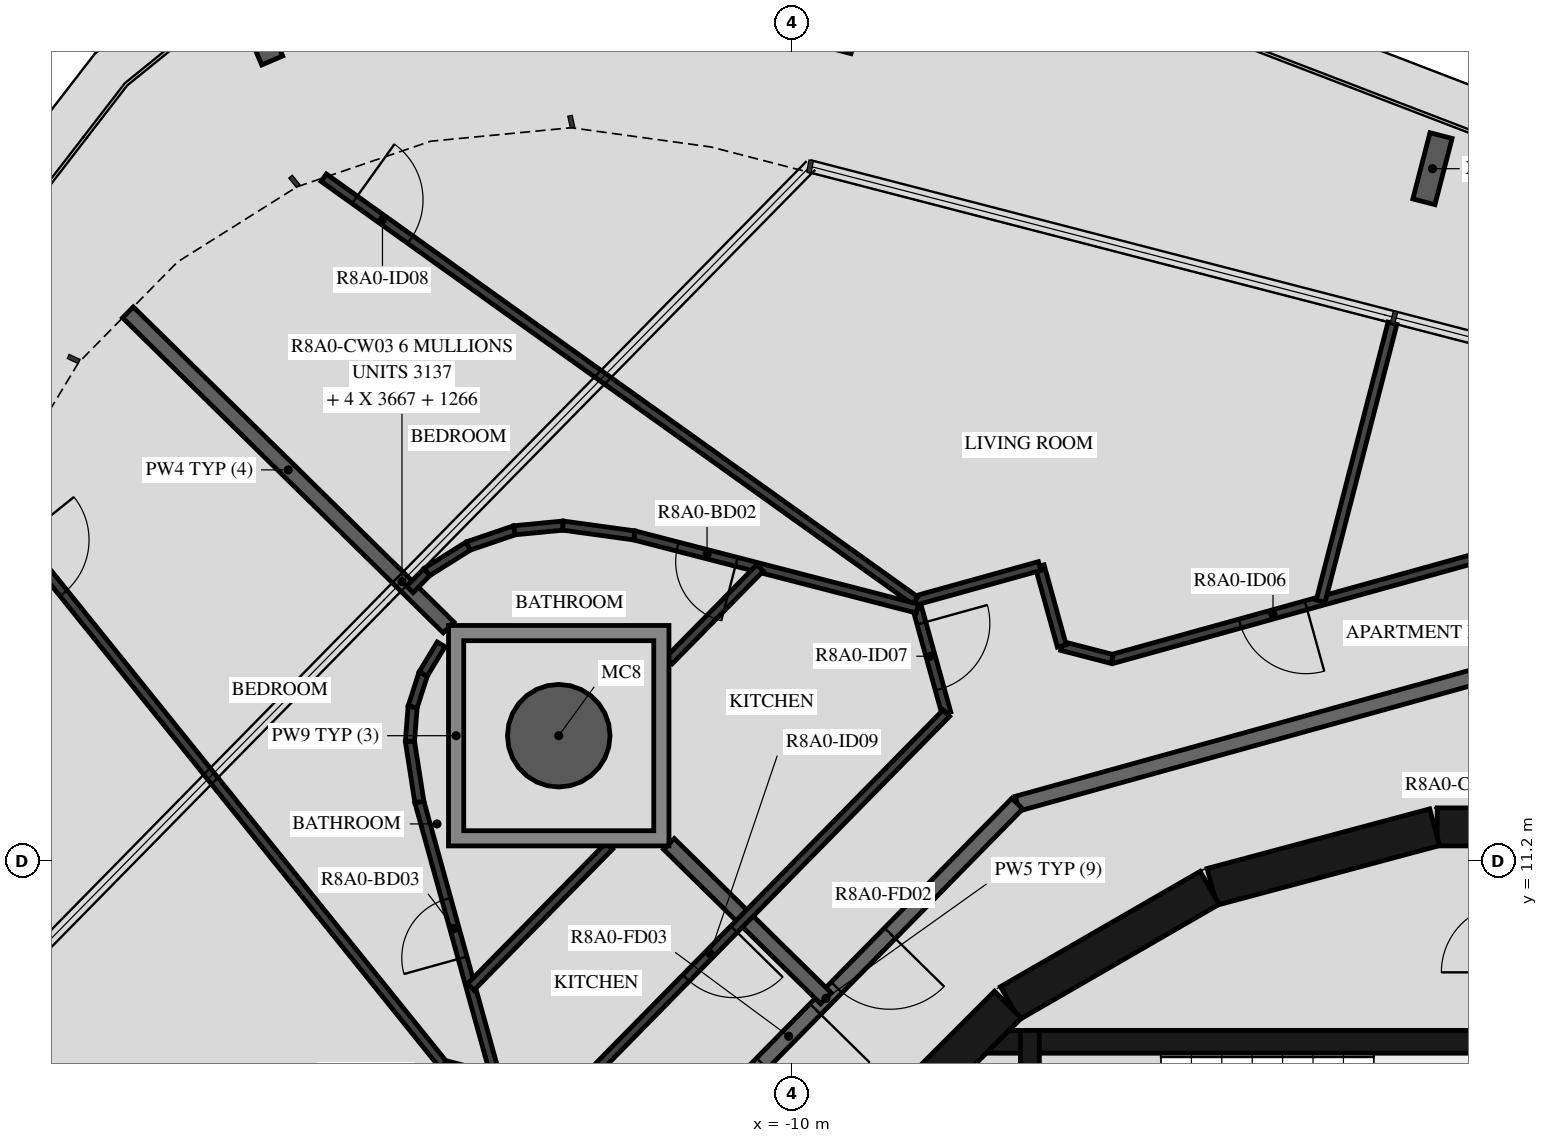
"""IFC4 building model, lengths in metres.
Left out: names, types, materials, properties, quantities, classifications, styles, units other than length and angle.
Written with IfcOpenShell. Run it as: python <this file> out.ifc"""

import sys

from ifc_helpers import new_model, si_unit, direction, frame, frame_2d, origin, origin_2d, place, context, subcontext, project, spatial, polyline, rectangle, hollow_circle, i_section, outline, extrude, element, fill, save


model = new_model("IFC4")
c1 = context("Model", 3, precision=1e-05, world=origin(), true_north=direction((0.0, 1.0)))
c2 = subcontext(c1, "Body", "Model", "MODEL_VIEW")
j1 = project(units=[si_unit("LENGTHUNIT", "METRE"), si_unit("PLANEANGLEUNIT", "RADIAN")], contexts=[c1])
p1 = place(None, origin())
s1 = spatial("IfcSite", under=j1, at=p1, CompositionType="ELEMENT")
p2 = place(p1, origin())
s2 = spatial("IfcBuilding", under=s1, at=p2, CompositionType="ELEMENT")
p3 = place(p2, frame((0.0, 0.0, 298.2)))
s3 = spatial("IfcBuildingStorey", under=s2, at=p3, CompositionType="ELEMENT", Elevation=298.2)
p4 = place(p3, frame((-13.073, 12.847, -0.45), z_axis=(0.0, 0.0, 1.0), x_axis=(1.0, 0.0, 0.0)))
e1 = element("IfcColumn", 1, at=p4, inside=s3, PredefinedType="COLUMN", context=c2, shape_type="SweptSolid", body=[
    extrude(hollow_circle(Radius=0.675, WallThickness=0.03, at=origin_2d()), origin(), (0.0, 0.0, 1.0), 3.57),
])
for number, where, z_axis, x_axis in (
    (2, (-1.579, 20.307, -0.45), (0.0, 0.0, 1.0), (0.968, -0.25, 0.0)),
    (3, (-9.261, 22.293, -0.45), (0.0, 0.0, 1.0), (0.968, -0.25, 0.0)),
    (4, (-17.019, 22.145, -0.45), (0.0, 0.0, 1.0), (0.921, 0.391, 0.0)),
):
    element("IfcColumn", number, at=place(p3, frame(where, z_axis=z_axis, x_axis=x_axis)), inside=s3, PredefinedType="COLUMN", context=c2, shape_type="SweptSolid", body=[
        extrude(i_section(OverallWidth=0.3, OverallDepth=0.9, WebThickness=0.019, FlangeThickness=0.035, FilletRadius=0.03, at=origin_2d()), origin(), (0.0, 0.0, 1.0), 3.57),
    ])
for number, where, z_axis, x_axis in (
    (5, (1.516, 11.647, 0.0), (0.0, 0.0, 1.0), (-1.0, 0.0, 0.0)),
    (6, (-1.55, 11.643, 0.0), (0.0, 0.0, 1.0), (-0.966, -0.259, 0.0)),
    (7, (-4.51, 10.845, 0.0), (0.0, 0.0, 1.0), (-0.866, -0.5, 0.0)),
):
    element("IfcWall", number, at=place(p3, frame(where, z_axis=z_axis, x_axis=x_axis)), inside=s3, PredefinedType="SHEAR", context=c2, shape_type="SweptSolid", body=[
        extrude(rectangle(XDim=3.033, YDim=0.5, at=frame_2d((1.516, 0.0))), origin(), (0.0, 0.0, 1.0), 3.12),
    ])
p5 = place(p3, frame((-7.164, 9.308, 0.0), z_axis=(0.0, 0.0, 1.0), x_axis=(-0.707106781187, -0.707106781187, 0.0)))
e8 = element("IfcWall", 8, at=p5, inside=s3, PredefinedType="SHEAR", context=c2, shape_type="SweptSolid", body=[
    extrude(rectangle(XDim=3.032, YDim=0.5, at=frame_2d((1.516, 0.0))), origin(), (0.0, 0.0, 1.0), 3.12),
])
p6 = place(p5, frame((1.416, 0.0, 0.0)))
e9 = element("IfcOpeningElement", 9, at=p6, cuts=e8, PredefinedType="OPENING", context=c2, shape_type="SweptSolid", body=[
    extrude(rectangle(XDim=1.2, YDim=2.1, at=frame_2d((0.6, 1.05))), frame((0.0, 0.26, 0.0), z_axis=(0.0, -1.0, 0.0), x_axis=(1.0, 0.0, 0.0)), (0.0, 0.0, 1.0), 0.52),
])
p7 = place(p3, frame((-6.75, 8.82, 0.0), z_axis=(0.0, 0.0, 1.0), x_axis=(1.0, 0.0, 0.0)))
e10 = element("IfcWall", 10, at=p7, inside=s3, PredefinedType="SHEAR", context=c2, shape_type="SweptSolid", body=[
    extrude(rectangle(XDim=6.75, YDim=0.3, at=frame_2d((3.375, 0.0))), origin(), (0.0, 0.0, 1.0), 3.12),
])
p8 = place(p3, frame((-6.875, 8.97, 0.0), z_axis=(0.0, 0.0, 1.0), x_axis=(0.0, -1.0, 0.0)))
e11 = element("IfcWall", 11, at=p8, inside=s3, PredefinedType="SHEAR", context=c2, shape_type="SweptSolid", body=[
    extrude(rectangle(XDim=3.92, YDim=0.25, at=frame_2d((1.96, 0.0))), origin(), (0.0, 0.0, 1.0), 3.12),
])
p9 = place(p8, frame((1.61, 0.0, 0.0)))
e12 = element("IfcOpeningElement", 12, at=p9, cuts=e11, PredefinedType="OPENING", context=c2, shape_type="SweptSolid", body=[
    extrude(rectangle(XDim=1.2, YDim=2.1, at=frame_2d((0.6, 1.05))), frame((0.0, 0.135, 0.0), z_axis=(0.0, -1.0, 0.0), x_axis=(1.0, 0.0, 0.0)), (0.0, 0.0, 1.0), 0.27),
])
p10 = place(p3, origin())
e13 = element("IfcWall", 13, at=p10, inside=s3, PredefinedType="SHEAR", context=c2, shape_type="SweptSolid", body=[
    extrude(outline(polyline([(-7.148, 8.97), (-7.0, 8.97), (-7.0, 8.67), (-7.448, 8.67), (-7.148, 8.97)])), origin(), (0.0, 0.0, 1.0), 3.12),
])
p11 = place(p3, frame((-0.121, 13.872, 0.0), z_axis=(0.0, 0.0, 1.0), x_axis=(-0.963625960674, -0.267254575108, 0.0)))
e14 = element("IfcWall", 14, at=p11, inside=s3, PredefinedType="STANDARD", context=c2, shape_type="SweptSolid", body=[
    extrude(rectangle(XDim=7.181, YDim=0.2, at=frame_2d((3.591, 0.0))), origin(), (0.0, 0.0, 1.0), 3.12),
])
p12 = place(p3, frame((-7.041, 11.953, 0.0), z_axis=(0.0, 0.0, 1.0), x_axis=(-0.70090916255, -0.713250549143, 0.0)))
e15 = element("IfcWall", 15, at=p12, inside=s3, PredefinedType="STANDARD", context=c2, shape_type="SweptSolid", body=[
    extrude(rectangle(XDim=7.181, YDim=0.2, at=frame_2d((3.59, 0.0))), origin(), (0.0, 0.0, 1.0), 3.12),
])
p13 = place(p12, frame((2.39, 0.0, 0.0)))
e16 = element("IfcOpeningElement", 16, at=p13, cuts=e15, PredefinedType="OPENING", context=c2, shape_type="SweptSolid", body=[
    extrude(rectangle(XDim=1.0, YDim=2.1, at=frame_2d((0.5, 1.05))), frame((0.0, 0.11, 0.0), z_axis=(0.0, -1.0, 0.0), x_axis=(1.0, 0.0, 0.0)), (0.0, 0.0, 1.0), 0.22),
])
p14 = place(p12, frame((3.791, 0.0, 0.0)))
e17 = element("IfcOpeningElement", 17, at=p14, cuts=e15, PredefinedType="OPENING", context=c2, shape_type="SweptSolid", body=[
    extrude(rectangle(XDim=1.0, YDim=2.1, at=frame_2d((0.5, 1.05))), frame((0.0, 0.11, 0.0), z_axis=(0.0, -1.0, 0.0), x_axis=(1.0, 0.0, 0.0)), (0.0, 0.0, 1.0), 0.22),
])
p15 = place(p3, frame((-11.623, 11.422, 0.0), z_axis=(0.0, 0.0, 1.0), x_axis=(0.713233657229, -0.700926351478, 0.0)))
e18 = element("IfcWall", 18, at=p15, inside=s3, PredefinedType="STANDARD", context=c2, shape_type="SweptSolid", body=[
    extrude(rectangle(XDim=2.896, YDim=0.2, at=frame_2d((1.448, 0.0))), origin(), (0.0, 0.0, 1.0), 3.12),
])
p16 = place(p3, frame((-18.741, 18.417, 0.0), z_axis=(0.0, 0.0, 1.0), x_axis=(0.713252414586, -0.700907264256, 0.0)))
e19 = element("IfcWall", 19, at=p16, inside=s3, PredefinedType="STANDARD", context=c2, shape_type="SweptSolid", body=[
    extrude(rectangle(XDim=5.913, YDim=0.2, at=frame_2d((2.957, 0.0))), origin(), (0.0, 0.0, 1.0), 3.12),
])
p17 = place(p3, frame((-0.135, 15.425, 0.0), z_axis=(0.0, 0.0, 1.0), x_axis=(-0.963635182689, -0.267221321536, 0.0)))
e20 = element("IfcWall", 20, at=p17, inside=s3, PredefinedType="PARTITIONING", context=c2, shape_type="SweptSolid", body=[
    extrude(rectangle(XDim=5.871, YDim=0.12, at=frame_2d((2.936, 0.0))), origin(), (0.0, 0.0, 1.0), 3.12),
])
p18 = place(p17, frame((3.225, 0.0, 0.0)))
e21 = element("IfcOpeningElement", 21, at=p18, cuts=e20, PredefinedType="OPENING", context=c2, shape_type="SweptSolid", body=[
    extrude(rectangle(XDim=0.9, YDim=2.1, at=frame_2d((0.45, 1.05))), frame((0.0, 0.07, 0.0), z_axis=(0.0, -1.0, 0.0), x_axis=(1.0, 0.0, 0.0)), (0.0, 0.0, 1.0), 0.14),
])
p19 = place(p3, frame((-5.792, 13.856, 0.0), z_axis=(0.0, 0.0, 1.0), x_axis=(-0.968137965662, 0.250417410425, 0.0)))
e22 = element("IfcWall", 22, at=p19, inside=s3, PredefinedType="PARTITIONING", context=c2, shape_type="SweptSolid", body=[
    extrude(rectangle(XDim=0.684, YDim=0.12, at=frame_2d((0.342, 0.0))), origin(), (0.0, 0.0, 1.0), 3.12),
])
p20 = place(p3, frame((-6.455, 14.028, 0.0), z_axis=(0.0, 0.0, 1.0), x_axis=(-0.267355376842, 0.963597998376, 0.0)))
e23 = element("IfcWall", 23, at=p20, inside=s3, PredefinedType="PARTITIONING", context=c2, shape_type="SweptSolid", body=[
    extrude(rectangle(XDim=1.091, YDim=0.12, at=frame_2d((0.546, 0.0))), origin(), (0.0, 0.0, 1.0), 3.12),
])
p21 = place(p3, frame((-6.746, 15.079, 0.0), z_axis=(0.0, 0.0, 1.0), x_axis=(-0.963624820233, -0.267258687102, 0.0)))
e24 = element("IfcWall", 24, at=p21, inside=s3, PredefinedType="PARTITIONING", context=c2, shape_type="SweptSolid", body=[
    extrude(rectangle(XDim=1.7, YDim=0.12, at=frame_2d((0.85, 0.0))), origin(), (0.0, 0.0, 1.0), 3.12),
])
p22 = place(p3, frame((-8.355, 14.519, 0.0), z_axis=(0.0, 0.0, 1.0), x_axis=(0.267052638692, -0.963681943469, 0.0)))
e25 = element("IfcWall", 25, at=p22, inside=s3, PredefinedType="PARTITIONING", context=c2, shape_type="SweptSolid", body=[
    extrude(rectangle(XDim=1.427, YDim=0.12, at=frame_2d((0.713, 0.0))), origin(), (0.0, 0.0, 1.0), 3.12),
])
p23 = place(p22, frame((0.2, 0.0, 0.0)))
e26 = element("IfcOpeningElement", 26, at=p23, cuts=e25, PredefinedType="OPENING", context=c2, shape_type="SweptSolid", body=[
    extrude(rectangle(XDim=0.9, YDim=2.1, at=frame_2d((0.45, 1.05))), frame((0.0, 0.07, 0.0), z_axis=(0.0, -1.0, 0.0), x_axis=(1.0, 0.0, 0.0)), (0.0, 0.0, 1.0), 0.14),
])
p24 = place(p3, frame((-7.974, 13.144, 0.0), z_axis=(0.0, 0.0, 1.0), x_axis=(-0.700910366085, -0.713249366432, 0.0)))
e27 = element("IfcWall", 27, at=p24, inside=s3, PredefinedType="PARTITIONING", context=c2, shape_type="SweptSolid", body=[
    extrude(rectangle(XDim=7.083, YDim=0.12, at=frame_2d((3.542, 0.0))), origin(), (0.0, 0.0, 1.0), 3.12),
])
p25 = place(p24, frame((3.986, 0.0, 0.0)))
e28 = element("IfcOpeningElement", 28, at=p25, cuts=e27, PredefinedType="OPENING", context=c2, shape_type="SweptSolid", body=[
    extrude(rectangle(XDim=0.9, YDim=2.1, at=frame_2d((0.45, 1.05))), frame((0.0, 0.07, 0.0), z_axis=(0.0, -1.0, 0.0), x_axis=(1.0, 0.0, 0.0)), (0.0, 0.0, 1.0), 0.14),
])
p26 = place(p3, frame((-2.104, 18.273, 0.0), z_axis=(0.0, 0.0, 1.0), x_axis=(-0.250390133523, -0.968145020663, 0.0)))
e29 = element("IfcWall", 29, at=p26, inside=s3, PredefinedType="PARTITIONING", context=c2, shape_type="SweptSolid", body=[
    extrude(rectangle(XDim=3.777, YDim=0.12, at=frame_2d((1.889, 0.0))), origin(), (0.0, 0.0, 1.0), 2.73),
])
p27 = place(p3, frame((-16.165, 20.188, 0.0), z_axis=(0.0, 0.0, 1.0), x_axis=(0.813459166979, -0.581622028175, 0.0)))
e30 = element("IfcWall", 30, at=p27, inside=s3, PredefinedType="PARTITIONING", context=c2, shape_type="SweptSolid", body=[
    extrude(rectangle(XDim=9.565, YDim=0.12, at=frame_2d((4.782, 0.0))), origin(), (0.0, 0.0, 1.0), 3.12),
])
p28 = place(p27, frame((0.5, 0.0, 0.0)))
e31 = element("IfcOpeningElement", 31, at=p28, cuts=e30, PredefinedType="OPENING", context=c2, shape_type="SweptSolid", body=[
    extrude(rectangle(XDim=0.9, YDim=2.1, at=frame_2d((0.45, 1.05))), frame((0.0, 0.07, 0.0), z_axis=(0.0, -1.0, 0.0), x_axis=(1.0, 0.0, 0.0)), (0.0, 0.0, 1.0), 0.14),
])
p29 = place(p3, frame((-8.355, 14.519, 0.0), z_axis=(0.0, 0.0, 1.0), x_axis=(-0.968146911612, 0.250382821969, 0.0)))
e32 = element("IfcWall", 32, at=p29, inside=s3, PredefinedType="PARTITIONING", context=c2, shape_type="SweptSolid", body=[
    extrude(rectangle(XDim=3.847, YDim=0.12, at=frame_2d((1.923, 0.0))), origin(), (0.0, 0.0, 1.0), 3.12),
])
p30 = place(p29, frame((2.458, 0.0, 0.0)))
e33 = element("IfcOpeningElement", 33, at=p30, cuts=e32, PredefinedType="OPENING", context=c2, shape_type="SweptSolid", body=[
    extrude(rectangle(XDim=0.8, YDim=2.1, at=frame_2d((0.4, 1.05))), frame((0.0, 0.07, 0.0), z_axis=(0.0, -1.0, 0.0), x_axis=(1.0, 0.0, 0.0)), (0.0, 0.0, 1.0), 0.14),
])
p31 = place(p3, frame((-10.425, 15.054, 0.0), z_axis=(0.0, 0.0, 1.0), x_axis=(-0.700866383264, -0.713292585698, 0.0)))
e34 = element("IfcWall", 34, at=p31, inside=s3, PredefinedType="PARTITIONING", context=c2, shape_type="SweptSolid", body=[
    extrude(rectangle(XDim=1.709, YDim=0.12, at=frame_2d((0.854, 0.0))), origin(), (0.0, 0.0, 1.0), 3.12),
])
p32 = place(p3, frame((-15.032, 14.772, 0.0), z_axis=(0.0, 0.0, 1.0), x_axis=(0.701378407906, 0.712789119532, 0.0)))
e35 = element("IfcWall", 35, at=p32, inside=s3, PredefinedType="PARTITIONING", context=c2, shape_type="SweptSolid", body=[
    extrude(rectangle(XDim=0.321, YDim=0.12, at=frame_2d((0.161, 0.0))), origin(), (0.0, 0.0, 1.0), 3.12),
])
p33 = place(p3, frame((-14.807, 15.0, 0.0), z_axis=(0.0, 0.0, 1.0), x_axis=(0.846499451836, 0.532389592349, 0.0)))
e36 = element("IfcWall", 36, at=p33, inside=s3, PredefinedType="PARTITIONING", context=c2, shape_type="SweptSolid", body=[
    extrude(rectangle(XDim=0.642, YDim=0.12, at=frame_2d((0.321, 0.0))), origin(), (0.0, 0.0, 1.0), 3.12),
])
for number, where, z_axis, x_axis in (
    (37, (-14.263, 15.342, 0.0), (0.0, 0.0, 1.0), (0.946, 0.323, 0.0)),
    (38, (-13.656, 15.55, 0.0), (0.0, 0.0, 1.0), (0.995, 0.096, 0.0)),
):
    element("IfcWall", number, at=place(p3, frame(where, z_axis=z_axis, x_axis=x_axis)), inside=s3, PredefinedType="PARTITIONING", context=c2, shape_type="SweptSolid", body=[
        extrude(rectangle(XDim=0.642, YDim=0.12, at=frame_2d((0.321, 0.0))), origin(), (0.0, 0.0, 1.0), 3.12),
    ])
p34 = place(p3, frame((-13.017, 15.611, 0.0), z_axis=(0.0, 0.0, 1.0), x_axis=(0.990688406717, -0.136148745119, 0.0)))
e39 = element("IfcWall", 39, at=p34, inside=s3, PredefinedType="PARTITIONING", context=c2, shape_type="SweptSolid", body=[
    extrude(rectangle(XDim=0.947, YDim=0.12, at=frame_2d((0.473, 0.0))), origin(), (0.0, 0.0, 1.0), 3.12),
])
p35 = place(p3, frame((-12.939, 8.092, 0.0), z_axis=(0.0, 0.0, 1.0), x_axis=(-0.968179141411, 0.250258166974, 0.0)))
e40 = element("IfcWall", 40, at=p35, inside=s3, PredefinedType="PARTITIONING", context=c2, shape_type="SweptSolid", body=[
    extrude(rectangle(XDim=1.709, YDim=0.12, at=frame_2d((0.854, 0.0))), origin(), (0.0, 0.0, 1.0), 3.12),
])
p36 = place(p3, frame((-13.899, 8.34, 0.0), z_axis=(0.0, 0.0, 1.0), x_axis=(-0.267286775597, 0.963617029525, 0.0)))
e41 = element("IfcWall", 41, at=p36, inside=s3, PredefinedType="PARTITIONING", context=c2, shape_type="SweptSolid", body=[
    extrude(rectangle(XDim=3.773, YDim=0.12, at=frame_2d((1.887, 0.0))), origin(), (0.0, 0.0, 1.0), 3.12),
])
p37 = place(p36, frame((1.646, 0.0, 0.0)))
e42 = element("IfcOpeningElement", 42, at=p37, cuts=e41, PredefinedType="OPENING", context=c2, shape_type="SweptSolid", body=[
    extrude(rectangle(XDim=0.8, YDim=2.1, at=frame_2d((0.4, 1.05))), frame((0.0, 0.07, 0.0), z_axis=(0.0, -1.0, 0.0), x_axis=(1.0, 0.0, 0.0)), (0.0, 0.0, 1.0), 0.14),
])
p38 = place(p3, frame((-14.907, 11.976, 0.0), z_axis=(0.0, 0.0, 1.0), x_axis=(-0.153398456533, 0.988164416245, 0.0)))
e43 = element("IfcWall", 43, at=p38, inside=s3, PredefinedType="PARTITIONING", context=c2, shape_type="SweptSolid", body=[
    extrude(rectangle(XDim=0.807, YDim=0.12, at=frame_2d((0.403, 0.0))), origin(), (0.0, 0.0, 1.0), 3.12),
])
for number, where, z_axis, x_axis in (
    (44, (-15.031, 12.773, 0.0), (0.0, 0.0, 1.0), (0.078, 0.997, 0.0)),
    (45, (-14.995, 13.227, 0.0), (0.0, 0.0, 1.0), (0.306, 0.952, 0.0)),
    (46, (-14.856, 13.66, 0.0), (0.0, 0.0, 1.0), (0.518, 0.855, 0.0)),
):
    element("IfcWall", number, at=place(p3, frame(where, z_axis=z_axis, x_axis=x_axis)), inside=s3, PredefinedType="PARTITIONING", context=c2, shape_type="SweptSolid", body=[
        extrude(rectangle(XDim=0.455, YDim=0.12, at=frame_2d((0.228, 0.0))), origin(), (0.0, 0.0, 1.0), 3.12),
    ])
p39 = place(p3, frame((-20.466, 15.812, 0.0), z_axis=(0.0, 0.0, 1.0), x_axis=(0.62719424473, -0.77886287585, 0.0)))
e47 = element("IfcWall", 47, at=p39, inside=s3, PredefinedType="PARTITIONING", context=c2, shape_type="SweptSolid", body=[
    extrude(rectangle(XDim=9.364, YDim=0.12, at=frame_2d((4.682, 0.0))), origin(), (0.0, 0.0, 1.0), 3.12),
])
p40 = place(p39, frame((0.5, 0.0, 0.0)))
e48 = element("IfcOpeningElement", 48, at=p40, cuts=e47, PredefinedType="OPENING", context=c2, shape_type="SweptSolid", body=[
    extrude(rectangle(XDim=0.9, YDim=2.1, at=frame_2d((0.45, 1.05))), frame((0.0, 0.07, 0.0), z_axis=(0.0, -1.0, 0.0), x_axis=(1.0, 0.0, 0.0)), (0.0, 0.0, 1.0), 0.14),
])
p41 = place(p3, frame((-14.232, 9.54, 0.0), z_axis=(0.0, 0.0, 1.0), x_axis=(0.700890401548, 0.713268985038, 0.0)))
e49 = element("IfcWall", 49, at=p41, inside=s3, PredefinedType="PARTITIONING", context=c2, shape_type="SweptSolid", body=[
    extrude(rectangle(XDim=2.604, YDim=0.12, at=frame_2d((1.302, 0.0))), origin(), (0.0, 0.0, 1.0), 3.12),
])
p42 = place(p3, origin())
e50 = element("IfcWall", 50, at=p42, inside=s3, PredefinedType="STANDARD", context=c2, shape_type="SweptSolid", body=[
    extrude(outline(polyline([(-11.623, 14.297), (-11.623, 11.397), (-14.523, 11.397), (-14.523, 14.297), (-11.623, 14.297)]), holes=[polyline([(-14.323, 11.597), (-11.823, 11.597), (-11.823, 14.097), (-14.323, 14.097), (-14.323, 11.597)])]), origin(), (0.0, 0.0, 1.0), 3.12),
])
p43 = place(p13, origin())
e51 = element("IfcDoor", 51, at=p43, inside=s3, OperationType="SINGLE_SWING_RIGHT", PredefinedType="DOOR", context=c2, shape_type="SweptSolid", body=[
    extrude(rectangle(XDim=1.0, YDim=2.1, at=frame_2d((0.5, 1.05))), frame((0.0, 0.025, 0.0), z_axis=(0.0, -1.0, 0.0), x_axis=(1.0, 0.0, 0.0)), (0.0, 0.0, 1.0), 0.05),
])
fill(e16, e51)
p44 = place(p18, origin())
e52 = element("IfcDoor", 52, at=p44, inside=s3, OperationType="SINGLE_SWING_RIGHT", PredefinedType="DOOR", context=c2, shape_type="SweptSolid", body=[
    extrude(rectangle(XDim=0.9, YDim=2.1, at=frame_2d((0.45, 1.05))), frame((0.0, 0.025, 0.0), z_axis=(0.0, -1.0, 0.0), x_axis=(1.0, 0.0, 0.0)), (0.0, 0.0, 1.0), 0.05),
])
fill(e21, e52)
p45 = place(p23, origin())
e53 = element("IfcDoor", 53, at=p45, inside=s3, OperationType="SINGLE_SWING_LEFT", PredefinedType="DOOR", context=c2, shape_type="SweptSolid", body=[
    extrude(rectangle(XDim=0.9, YDim=2.1, at=frame_2d((0.45, 1.05))), frame((0.0, 0.025, 0.0), z_axis=(0.0, -1.0, 0.0), x_axis=(1.0, 0.0, 0.0)), (0.0, 0.0, 1.0), 0.05),
])
fill(e26, e53)
p46 = place(p28, origin())
e54 = element("IfcDoor", 54, at=p46, inside=s3, OperationType="SINGLE_SWING_RIGHT", PredefinedType="DOOR", context=c2, shape_type="SweptSolid", body=[
    extrude(rectangle(XDim=0.9, YDim=2.1, at=frame_2d((0.45, 1.05))), frame((0.0, 0.025, 0.0), z_axis=(0.0, -1.0, 0.0), x_axis=(1.0, 0.0, 0.0)), (0.0, 0.0, 1.0), 0.05),
])
fill(e31, e54)
p47 = place(p30, origin())
e55 = element("IfcDoor", 55, at=p47, inside=s3, OperationType="SINGLE_SWING_LEFT", PredefinedType="DOOR", context=c2, shape_type="SweptSolid", body=[
    extrude(rectangle(XDim=0.8, YDim=2.1, at=frame_2d((0.4, 1.05))), frame((0.0, 0.025, 0.0), z_axis=(0.0, -1.0, 0.0), x_axis=(1.0, 0.0, 0.0)), (0.0, 0.0, 1.0), 0.05),
])
fill(e33, e55)
p48 = place(p14, origin())
e56 = element("IfcDoor", 56, at=p48, inside=s3, OperationType="SINGLE_SWING_LEFT", PredefinedType="DOOR", context=c2, shape_type="SweptSolid", body=[
    extrude(rectangle(XDim=1.0, YDim=2.1, at=frame_2d((0.5, 1.05))), frame((0.0, 0.025, 0.0), z_axis=(0.0, -1.0, 0.0), x_axis=(1.0, 0.0, 0.0)), (0.0, 0.0, 1.0), 0.05),
])
fill(e17, e56)
p49 = place(p25, origin())
e57 = element("IfcDoor", 57, at=p49, inside=s3, OperationType="SINGLE_SWING_LEFT", PredefinedType="DOOR", context=c2, shape_type="SweptSolid", body=[
    extrude(rectangle(XDim=0.9, YDim=2.1, at=frame_2d((0.45, 1.05))), frame((0.0, 0.025, 0.0), z_axis=(0.0, -1.0, 0.0), x_axis=(1.0, 0.0, 0.0)), (0.0, 0.0, 1.0), 0.05),
])
fill(e28, e57)
p50 = place(p40, origin())
e58 = element("IfcDoor", 58, at=p50, inside=s3, OperationType="SINGLE_SWING_LEFT", PredefinedType="DOOR", context=c2, shape_type="SweptSolid", body=[
    extrude(rectangle(XDim=0.9, YDim=2.1, at=frame_2d((0.45, 1.05))), frame((0.0, 0.025, 0.0), z_axis=(0.0, -1.0, 0.0), x_axis=(1.0, 0.0, 0.0)), (0.0, 0.0, 1.0), 0.05),
])
fill(e48, e58)
p51 = place(p37, origin())
e59 = element("IfcDoor", 59, at=p51, inside=s3, OperationType="SINGLE_SWING_RIGHT", PredefinedType="DOOR", context=c2, shape_type="SweptSolid", body=[
    extrude(rectangle(XDim=0.8, YDim=2.1, at=frame_2d((0.4, 1.05))), frame((0.0, 0.025, 0.0), z_axis=(0.0, -1.0, 0.0), x_axis=(1.0, 0.0, 0.0)), (0.0, 0.0, 1.0), 0.05),
])
fill(e42, e59)
save(model, sys.argv[1])
